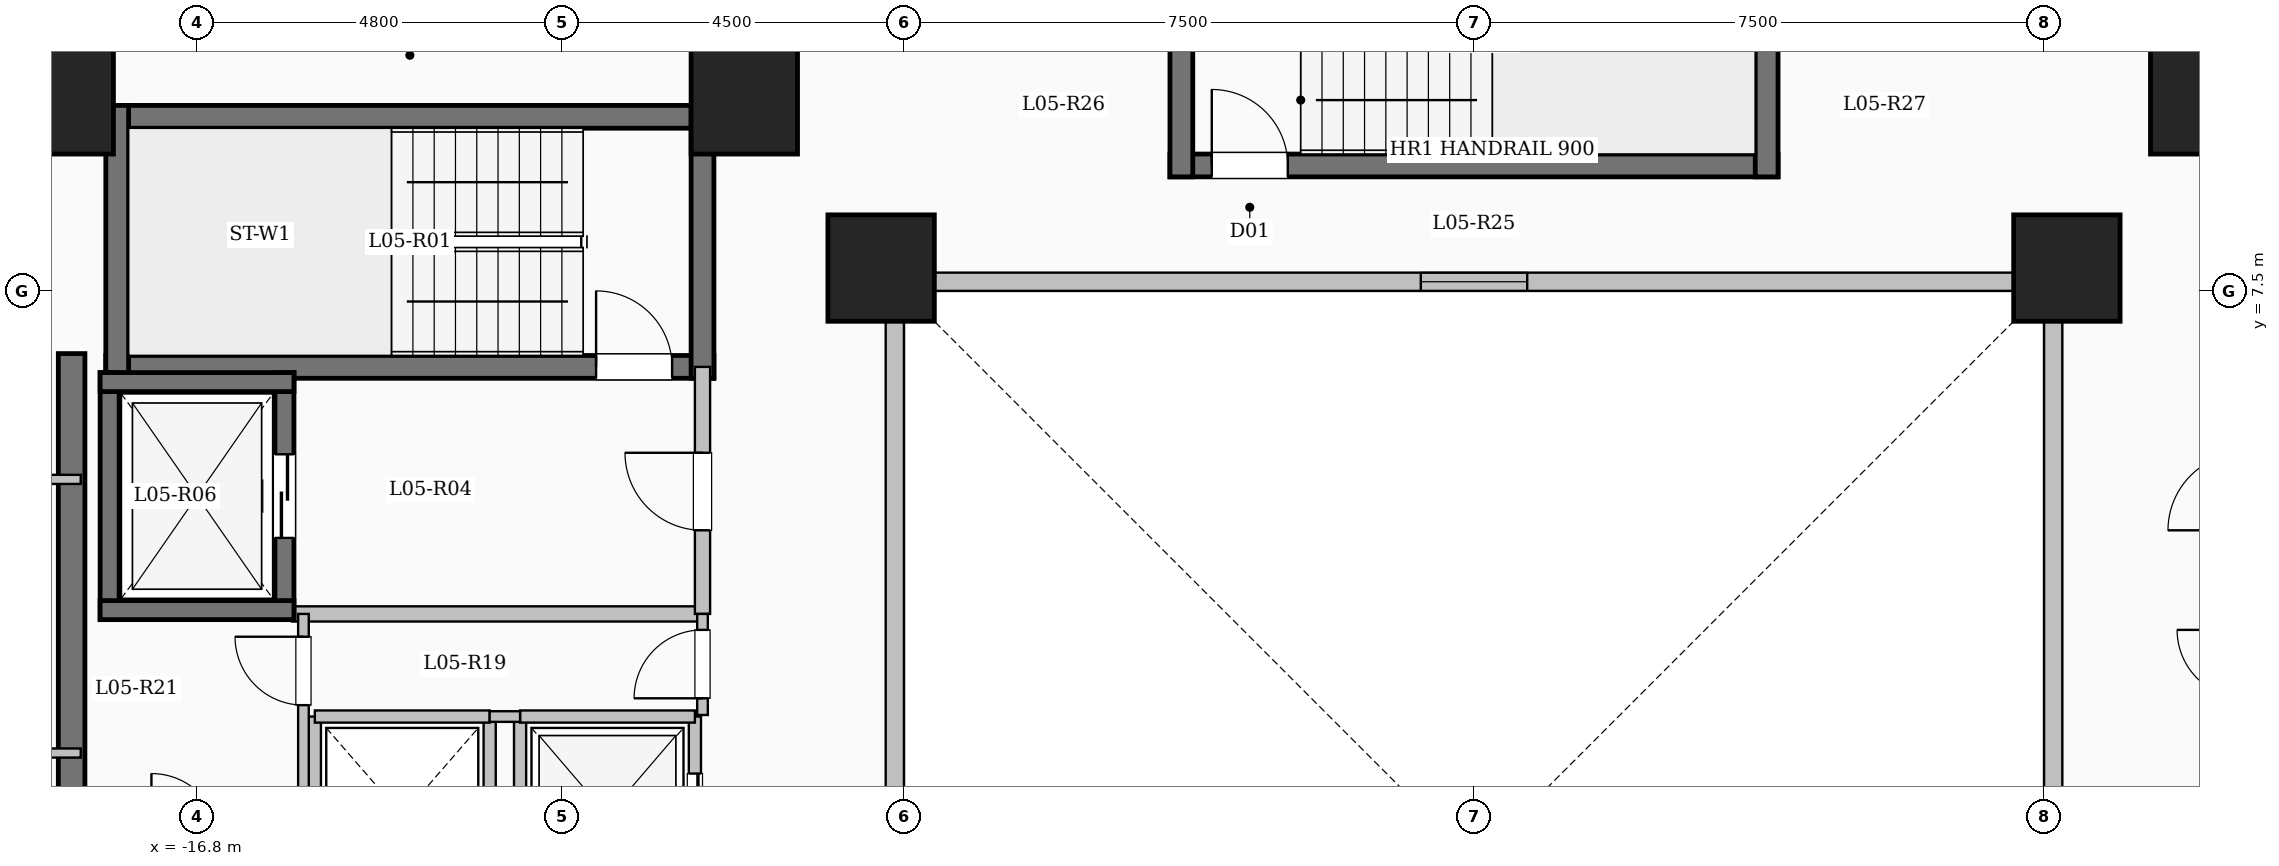
"""IFC4 building model, lengths in metres.
Left out: names, types, materials, properties, quantities, classifications, styles, units other than length and angle.
Written with IfcOpenShell. Run it as: python <this file> out.ifc"""

import sys

from ifc_helpers import new_model, si_unit, direction, frame, frame_2d, origin, origin_2d, place, context, subcontext, project, spatial, rectangle, extrude, element, fill, save


model = new_model("IFC4")
c1 = context("Model", 3, precision=1e-05, world=origin(), true_north=direction((0.0, 1.0)))
c2 = subcontext(c1, "Body", "Model", "MODEL_VIEW")
j1 = project(units=[si_unit("LENGTHUNIT", "METRE"), si_unit("PLANEANGLEUNIT", "RADIAN")], contexts=[c1])
p1 = place(None, origin())
s1 = spatial("IfcSite", under=j1, at=p1, CompositionType="ELEMENT")
p2 = place(p1, origin())
s2 = spatial("IfcBuilding", under=s1, at=p2, CompositionType="ELEMENT")
p3 = place(p2, frame((0.0, 0.0, 24.0)))
s3 = spatial("IfcBuildingStorey", under=s2, at=p3, CompositionType="ELEMENT", Elevation=24.0)
for number, where, z_axis, x_axis in (
    (1, (-7.8, 7.8, 0.0), (0.0, 0.0, 1.0), (1.0, 0.0, 0.0)),
    (2, (7.8, 7.8, 0.0), (0.0, 0.0, 1.0), (1.0, 0.0, 0.0)),
    (3, (-9.6, 10.0, 0.0), (0.0, 0.0, 1.0), (1.0, 0.0, 0.0)),
    (4, (9.6, 10.0, 0.0), (0.0, 0.0, 1.0), (1.0, 0.0, 0.0)),
    (5, (-18.6, 10.0, 0.0), (0.0, 0.0, 1.0), (1.0, 0.0, 0.0)),
):
    element("IfcColumn", number, at=place(p3, frame(where, z_axis=z_axis, x_axis=x_axis)), inside=s3, PredefinedType="COLUMN", context=c2, shape_type="SweptSolid", body=[
        extrude(rectangle(XDim=1.4, YDim=1.4, at=origin_2d()), origin(), (0.0, 0.0, 1.0), 3.35),
    ])
p4 = place(p3, frame((7.62, -7.62, 0.0), z_axis=(0.0, 0.0, 1.0), x_axis=(0.0, 1.0, 0.0)))
e6 = element("IfcWall", 6, at=p4, inside=s3, PredefinedType="SOLIDWALL", context=c2, shape_type="SweptSolid", body=[
    extrude(rectangle(XDim=15.24, YDim=0.24, at=frame_2d((7.62, 0.0))), origin(), (0.0, 0.0, 1.0), 3.1),
])
p5 = place(p4, frame((6.92, 0.0, 0.95)))
e7 = element("IfcOpeningElement", 7, at=p5, cuts=e6, PredefinedType="OPENING", context=c2, shape_type="SweptSolid", body=[
    extrude(rectangle(XDim=1.4, YDim=1.5, at=frame_2d((0.7, 0.75))), frame((0.0, 0.13, 0.0), z_axis=(0.0, -1.0, 0.0), x_axis=(1.0, 0.0, 0.0)), (0.0, 0.0, 1.0), 0.26),
])
p6 = place(p3, frame((7.62, 7.62, 0.0), z_axis=(0.0, 0.0, 1.0), x_axis=(-1.0, 0.0, 0.0)))
e8 = element("IfcWall", 8, at=p6, inside=s3, PredefinedType="SOLIDWALL", context=c2, shape_type="SweptSolid", body=[
    extrude(rectangle(XDim=15.24, YDim=0.24, at=frame_2d((7.62, 0.0))), origin(), (0.0, 0.0, 1.0), 3.1),
])
p7 = place(p6, frame((6.92, 0.0, 0.95)))
e9 = element("IfcOpeningElement", 9, at=p7, cuts=e8, PredefinedType="OPENING", context=c2, shape_type="SweptSolid", body=[
    extrude(rectangle(XDim=1.4, YDim=1.5, at=frame_2d((0.7, 0.75))), frame((0.0, 0.13, 0.0), z_axis=(0.0, -1.0, 0.0), x_axis=(1.0, 0.0, 0.0)), (0.0, 0.0, 1.0), 0.26),
])
p8 = place(p3, frame((-7.62, 7.62, 0.0), z_axis=(0.0, 0.0, 1.0), x_axis=(0.0, -1.0, 0.0)))
e10 = element("IfcWall", 10, at=p8, inside=s3, PredefinedType="SOLIDWALL", context=c2, shape_type="SweptSolid", body=[
    extrude(rectangle(XDim=15.24, YDim=0.24, at=frame_2d((7.62, 0.0))), origin(), (0.0, 0.0, 1.0), 3.1),
])
p9 = place(p8, frame((6.92, 0.0, 0.95)))
e11 = element("IfcOpeningElement", 11, at=p9, cuts=e10, PredefinedType="OPENING", context=c2, shape_type="SweptSolid", body=[
    extrude(rectangle(XDim=1.4, YDim=1.5, at=frame_2d((0.7, 0.75))), frame((0.0, 0.13, 0.0), z_axis=(0.0, -1.0, 0.0), x_axis=(1.0, 0.0, 0.0)), (0.0, 0.0, 1.0), 0.26),
])
p10 = place(p3, frame((-18.0, 9.79, 0.0), z_axis=(0.0, 0.0, 1.0), x_axis=(1.0, 0.0, 0.0)))
e12 = element("IfcWall", 12, at=p10, inside=s3, PredefinedType="SHEAR", context=c2, shape_type="SweptSolid", body=[
    extrude(rectangle(XDim=8.0, YDim=0.3, at=frame_2d((4.0, 0.0))), origin(), (0.0, 0.0, 1.0), 3.35),
])
p11 = place(p3, frame((-18.0, 6.5, 0.0), z_axis=(0.0, 0.0, 1.0), x_axis=(1.0, 0.0, 0.0)))
e13 = element("IfcWall", 13, at=p11, inside=s3, PredefinedType="SHEAR", context=c2, shape_type="SweptSolid", body=[
    extrude(rectangle(XDim=8.0, YDim=0.3, at=frame_2d((4.0, 0.0))), origin(), (0.0, 0.0, 1.0), 3.35),
])
p12 = place(p11, frame((6.45, 0.0, 0.0)))
e14 = element("IfcOpeningElement", 14, at=p12, cuts=e13, PredefinedType="OPENING", context=c2, shape_type="SweptSolid", body=[
    extrude(rectangle(XDim=1.0, YDim=2.15, at=frame_2d((0.5, 1.075))), frame((0.0, 0.16, 0.0), z_axis=(0.0, -1.0, 0.0), x_axis=(1.0, 0.0, 0.0)), (0.0, 0.0, 1.0), 0.32),
])
for number, where, z_axis, x_axis in (
    (15, (-17.85, 6.35, 0.0), (0.0, 0.0, 1.0), (0.0, 1.0, 0.0)),
    (16, (-10.15, 6.35, 0.0), (0.0, 0.0, 1.0), (0.0, 1.0, 0.0)),
):
    element("IfcWall", number, at=place(p3, frame(where, z_axis=z_axis, x_axis=x_axis)), inside=s3, PredefinedType="SHEAR", context=c2, shape_type="SweptSolid", body=[
        extrude(rectangle(XDim=3.59, YDim=0.3, at=frame_2d((1.795, 0.0))), origin(), (0.0, 0.0, 1.0), 3.35),
    ])
p13 = place(p3, frame((-4.0, 9.15, 0.0), z_axis=(0.0, 0.0, 1.0), x_axis=(1.0, 0.0, 0.0)))
e17 = element("IfcWall", 17, at=p13, inside=s3, PredefinedType="SHEAR", context=c2, shape_type="SweptSolid", body=[
    extrude(rectangle(XDim=8.0, YDim=0.3, at=frame_2d((4.0, 0.0))), origin(), (0.0, 0.0, 1.0), 3.35),
])
p14 = place(p13, frame((0.55, 0.0, 0.0)))
e18 = element("IfcOpeningElement", 18, at=p14, cuts=e17, PredefinedType="OPENING", context=c2, shape_type="SweptSolid", body=[
    extrude(rectangle(XDim=1.0, YDim=2.15, at=frame_2d((0.5, 1.075))), frame((0.0, 0.16, 0.0), z_axis=(0.0, -1.0, 0.0), x_axis=(1.0, 0.0, 0.0)), (0.0, 0.0, 1.0), 0.32),
])
for number, where, z_axis, x_axis in (
    (19, (-3.85, 9.0, 0.0), (0.0, 0.0, 1.0), (0.0, 1.0, 0.0)),
    (20, (3.85, 9.0, 0.0), (0.0, 0.0, 1.0), (0.0, 1.0, 0.0)),
):
    element("IfcWall", number, at=place(p3, frame(where, z_axis=z_axis, x_axis=x_axis)), inside=s3, PredefinedType="SHEAR", context=c2, shape_type="SweptSolid", body=[
        extrude(rectangle(XDim=3.59, YDim=0.3, at=frame_2d((1.795, 0.0))), origin(), (0.0, 0.0, 1.0), 3.35),
    ])
p15 = place(p3, frame((-15.55, 3.25, 0.0), z_axis=(0.0, 0.0, 1.0), x_axis=(1.0, 0.0, 0.0)))
e21 = element("IfcWall", 21, at=p15, inside=s3, PredefinedType="SOLIDWALL", context=c2, shape_type="SweptSolid", body=[
    extrude(rectangle(XDim=5.4, YDim=0.2, at=frame_2d((2.7, 0.0))), origin(), (0.0, 0.0, 1.0), 3.1),
])
p16 = place(p3, frame((-10.15, 3.25, 0.0), z_axis=(0.0, 0.0, 1.0), x_axis=(0.0, 1.0, 0.0)))
e22 = element("IfcWall", 22, at=p16, inside=s3, PredefinedType="SOLIDWALL", context=c2, shape_type="SweptSolid", body=[
    extrude(rectangle(XDim=3.25, YDim=0.2, at=frame_2d((1.625, 0.0))), origin(), (0.0, 0.0, 1.0), 3.1),
])
p17 = place(p16, frame((1.1, 0.0, 0.0)))
e23 = element("IfcOpeningElement", 23, at=p17, cuts=e22, PredefinedType="OPENING", context=c2, shape_type="SweptSolid", body=[
    extrude(rectangle(XDim=1.02, YDim=2.15, at=frame_2d((0.51, 1.075))), frame((0.0, 0.11, 0.0), z_axis=(0.0, -1.0, 0.0), x_axis=(1.0, 0.0, 0.0)), (0.0, 0.0, 1.0), 0.22),
])
p18 = place(p3, frame((-17.95, 3.175, 0.0), z_axis=(0.0, 0.0, 1.0), x_axis=(0.0, 1.0, 0.0)))
e24 = element("IfcWall", 24, at=p18, inside=s3, PredefinedType="SHEAR", context=c2, shape_type="SweptSolid", body=[
    extrude(rectangle(XDim=3.25, YDim=0.25, at=frame_2d((1.625, 0.0))), origin(), (0.0, 0.0, 1.0), 3.35),
])
p19 = place(p3, frame((-15.65, 3.175, 0.0), z_axis=(0.0, 0.0, 1.0), x_axis=(0.0, 1.0, 0.0)))
e25 = element("IfcWall", 25, at=p19, inside=s3, PredefinedType="SHEAR", context=c2, shape_type="SweptSolid", body=[
    extrude(rectangle(XDim=3.25, YDim=0.25, at=frame_2d((1.625, 0.0))), origin(), (0.0, 0.0, 1.0), 3.35),
])
p20 = place(p19, frame((1.075, 0.0, 0.0)))
e26 = element("IfcOpeningElement", 26, at=p20, cuts=e25, PredefinedType="OPENING", context=c2, shape_type="SweptSolid", body=[
    extrude(rectangle(XDim=1.1, YDim=2.15, at=frame_2d((0.55, 1.075))), frame((0.0, 0.135, 0.0), z_axis=(0.0, -1.0, 0.0), x_axis=(1.0, 0.0, 0.0)), (0.0, 0.0, 1.0), 0.27),
])
for number, where, z_axis, x_axis in (
    (27, (-18.075, 3.3, 0.0), (0.0, 0.0, 1.0), (1.0, 0.0, 0.0)),
    (28, (-18.075, 6.3, 0.0), (0.0, 0.0, 1.0), (1.0, 0.0, 0.0)),
):
    element("IfcWall", number, at=place(p3, frame(where, z_axis=z_axis, x_axis=x_axis)), inside=s3, PredefinedType="SHEAR", context=c2, shape_type="SweptSolid", body=[
        extrude(rectangle(XDim=2.55, YDim=0.25, at=frame_2d((1.275, 0.0))), origin(), (0.0, 0.0, 1.0), 3.35),
    ])
p21 = place(p3, frame((-12.55, -0.7, 0.0), z_axis=(0.0, 0.0, 1.0), x_axis=(0.0, 1.0, 0.0)))
e29 = element("IfcWall", 29, at=p21, inside=s3, PredefinedType="SOLIDWALL", context=c2, shape_type="SweptSolid", body=[
    extrude(rectangle(XDim=2.6, YDim=0.16, at=frame_2d((1.3, 0.0))), origin(), (0.0, 0.0, 1.0), 3.1),
])
p22 = place(p3, frame((-10.25, -0.7, 0.0), z_axis=(0.0, 0.0, 1.0), x_axis=(0.0, 1.0, 0.0)))
e30 = element("IfcWall", 30, at=p22, inside=s3, PredefinedType="SOLIDWALL", context=c2, shape_type="SweptSolid", body=[
    extrude(rectangle(XDim=2.6, YDim=0.16, at=frame_2d((1.3, 0.0))), origin(), (0.0, 0.0, 1.0), 3.1),
])
p23 = place(p22, frame((0.75, 0.0, 0.0)))
e31 = element("IfcOpeningElement", 31, at=p23, cuts=e30, PredefinedType="OPENING", context=c2, shape_type="SweptSolid", body=[
    extrude(rectangle(XDim=1.1, YDim=2.15, at=frame_2d((0.55, 1.075))), frame((0.0, 0.09, 0.0), z_axis=(0.0, -1.0, 0.0), x_axis=(1.0, 0.0, 0.0)), (0.0, 0.0, 1.0), 0.18),
])
p24 = place(p3, frame((-12.55, 1.9, 0.0), z_axis=(0.0, 0.0, 1.0), x_axis=(1.0, 0.0, 0.0)))
e32 = element("IfcWall", 32, at=p24, inside=s3, PredefinedType="SOLIDWALL", context=c2, shape_type="SweptSolid", body=[
    extrude(rectangle(XDim=2.3, YDim=0.16, at=frame_2d((1.15, 0.0))), origin(), (0.0, 0.0, 1.0), 3.1),
])
for number, where, z_axis, x_axis in (
    (33, (-15.25, -0.7, 0.0), (0.0, 0.0, 1.0), (0.0, 1.0, 0.0)),
    (34, (-12.95, -0.7, 0.0), (0.0, 0.0, 1.0), (0.0, 1.0, 0.0)),
):
    element("IfcWall", number, at=place(p3, frame(where, z_axis=z_axis, x_axis=x_axis)), inside=s3, PredefinedType="SOLIDWALL", context=c2, shape_type="SweptSolid", body=[
        extrude(rectangle(XDim=2.6, YDim=0.16, at=frame_2d((1.3, 0.0))), origin(), (0.0, 0.0, 1.0), 3.1),
    ])
p25 = place(p3, frame((-15.25, 1.9, 0.0), z_axis=(0.0, 0.0, 1.0), x_axis=(1.0, 0.0, 0.0)))
e35 = element("IfcWall", 35, at=p25, inside=s3, PredefinedType="SOLIDWALL", context=c2, shape_type="SweptSolid", body=[
    extrude(rectangle(XDim=2.3, YDim=0.16, at=frame_2d((1.15, 0.0))), origin(), (0.0, 0.0, 1.0), 3.1),
])
p26 = place(p3, frame((-18.45, -7.375, 0.0), z_axis=(0.0, 0.0, 1.0), x_axis=(0.0, 1.0, 0.0)))
e36 = element("IfcWall", 36, at=p26, inside=s3, PredefinedType="SHEAR", context=c2, shape_type="SweptSolid", body=[
    extrude(rectangle(XDim=14.05, YDim=0.35, at=frame_2d((7.025, 0.0))), origin(), (0.0, 0.0, 1.0), 3.35),
])
p27 = place(p3, frame((-12.95, 1.9, 0.0), z_axis=(0.0, 0.0, 1.0), x_axis=(1.0, 0.0, 0.0)))
e37 = element("IfcWall", 37, at=p27, inside=s3, PredefinedType="PARTITIONING", context=c2, shape_type="SweptSolid", body=[
    extrude(rectangle(XDim=0.4, YDim=0.14, at=frame_2d((0.2, 0.0))), origin(), (0.0, 0.0, 1.0), 3.1),
])
p28 = place(p3, frame((-10.15, 1.92, 0.0), z_axis=(0.0, 0.0, 1.0), x_axis=(0.0, 1.0, 0.0)))
e38 = element("IfcWall", 38, at=p28, inside=s3, PredefinedType="PARTITIONING", context=c2, shape_type="SweptSolid", body=[
    extrude(rectangle(XDim=1.33, YDim=0.14, at=frame_2d((0.665, 0.0))), origin(), (0.0, 0.0, 1.0), 3.1),
])
p29 = place(p28, frame((0.22, 0.0, 0.0)))
e39 = element("IfcOpeningElement", 39, at=p29, cuts=e38, PredefinedType="OPENING", context=c2, shape_type="SweptSolid", body=[
    extrude(rectangle(XDim=0.9, YDim=2.08, at=frame_2d((0.45, 1.04))), frame((0.0, 0.08, 0.0), z_axis=(0.0, -1.0, 0.0), x_axis=(1.0, 0.0, 0.0)), (0.0, 0.0, 1.0), 0.16),
])
p30 = place(p3, frame((-15.4, -7.2, 0.0), z_axis=(0.0, 0.0, 1.0), x_axis=(0.0, 1.0, 0.0)))
e40 = element("IfcWall", 40, at=p30, inside=s3, PredefinedType="PARTITIONING", context=c2, shape_type="SweptSolid", body=[
    extrude(rectangle(XDim=10.45, YDim=0.14, at=frame_2d((5.225, 0.0))), origin(), (0.0, 0.0, 1.0), 3.1),
])
p31 = place(p30, frame((9.25, 0.0, 0.0)))
e41 = element("IfcOpeningElement", 41, at=p31, cuts=e40, PredefinedType="OPENING", context=c2, shape_type="SweptSolid", body=[
    extrude(rectangle(XDim=0.9, YDim=2.08, at=frame_2d((0.45, 1.04))), frame((0.0, 0.08, 0.0), z_axis=(0.0, -1.0, 0.0), x_axis=(1.0, 0.0, 0.0)), (0.0, 0.0, 1.0), 0.16),
])
p32 = place(p3, frame((-28.8, 1.42, 0.0), z_axis=(0.0, 0.0, 1.0), x_axis=(1.0, 0.0, 0.0)))
e42 = element("IfcWall", 42, at=p32, inside=s3, PredefinedType="PARTITIONING", context=c2, shape_type="SweptSolid", body=[
    extrude(rectangle(XDim=10.47, YDim=0.12, at=frame_2d((5.235, 0.0))), origin(), (0.0, 0.0, 1.0), 3.1),
])
p33 = place(p32, frame((2.213, 0.0, 0.0)))
e43 = element("IfcOpeningElement", 43, at=p33, cuts=e42, PredefinedType="OPENING", context=c2, shape_type="SweptSolid", body=[
    extrude(rectangle(XDim=0.88, YDim=2.1, at=frame_2d((0.44, 1.05))), frame((0.0, 0.07, 0.0), z_axis=(0.0, -1.0, 0.0), x_axis=(1.0, 0.0, 0.0)), (0.0, 0.0, 1.0), 0.14),
])
p34 = place(p32, frame((7.278, 0.0, 0.0)))
e44 = element("IfcOpeningElement", 44, at=p34, cuts=e42, PredefinedType="OPENING", context=c2, shape_type="SweptSolid", body=[
    extrude(rectangle(XDim=0.88, YDim=2.1, at=frame_2d((0.44, 1.05))), frame((0.0, 0.07, 0.0), z_axis=(0.0, -1.0, 0.0), x_axis=(1.0, 0.0, 0.0)), (0.0, 0.0, 1.0), 0.14),
])
p35 = place(p3, frame((-28.8, 5.02, 0.0), z_axis=(0.0, 0.0, 1.0), x_axis=(1.0, 0.0, 0.0)))
e45 = element("IfcWall", 45, at=p35, inside=s3, PredefinedType="PARTITIONING", context=c2, shape_type="SweptSolid", body=[
    extrude(rectangle(XDim=10.47, YDim=0.12, at=frame_2d((5.235, 0.0))), origin(), (0.0, 0.0, 1.0), 3.1),
])
p36 = place(p35, frame((8.9, 0.0, 0.0)))
e46 = element("IfcOpeningElement", 46, at=p36, cuts=e45, PredefinedType="OPENING", context=c2, shape_type="SweptSolid", body=[
    extrude(rectangle(XDim=0.88, YDim=2.1, at=frame_2d((0.44, 1.05))), frame((0.0, 0.07, 0.0), z_axis=(0.0, -1.0, 0.0), x_axis=(1.0, 0.0, 0.0)), (0.0, 0.0, 1.0), 0.14),
])
p37 = place(p7, origin())
e47 = element("IfcWindow", 47, at=p37, inside=s3, PartitioningType="SINGLE_PANEL", PredefinedType="WINDOW", context=c2, shape_type="SweptSolid", body=[
    extrude(rectangle(XDim=1.4, YDim=1.5, at=frame_2d((0.7, 0.75))), frame((0.0, 0.03, 0.0), z_axis=(0.0, -1.0, 0.0), x_axis=(1.0, 0.0, 0.0)), (0.0, 0.0, 1.0), 0.06),
])
fill(e9, e47)
p38 = place(p12, origin())
e48 = element("IfcDoor", 48, at=p38, inside=s3, OperationType="SINGLE_SWING_LEFT", PredefinedType="DOOR", context=c2, shape_type="SweptSolid", body=[
    extrude(rectangle(XDim=1.0, YDim=2.15, at=frame_2d((0.5, 1.075))), frame((0.0, 0.025, 0.0), z_axis=(0.0, -1.0, 0.0), x_axis=(1.0, 0.0, 0.0)), (0.0, 0.0, 1.0), 0.05),
])
fill(e14, e48)
p39 = place(p14, origin())
e49 = element("IfcDoor", 49, at=p39, inside=s3, OperationType="SINGLE_SWING_LEFT", PredefinedType="DOOR", context=c2, shape_type="SweptSolid", body=[
    extrude(rectangle(XDim=1.0, YDim=2.15, at=frame_2d((0.5, 1.075))), frame((0.0, 0.025, 0.0), z_axis=(0.0, -1.0, 0.0), x_axis=(1.0, 0.0, 0.0)), (0.0, 0.0, 1.0), 0.05),
])
fill(e18, e49)
p40 = place(p17, origin())
e50 = element("IfcDoor", 50, at=p40, inside=s3, OperationType="SINGLE_SWING_RIGHT", PredefinedType="DOOR", context=c2, shape_type="SweptSolid", body=[
    extrude(rectangle(XDim=1.02, YDim=2.15, at=frame_2d((0.51, 1.075))), frame((0.0, 0.025, 0.0), z_axis=(0.0, -1.0, 0.0), x_axis=(1.0, 0.0, 0.0)), (0.0, 0.0, 1.0), 0.05),
])
fill(e23, e50)
p41 = place(p20, origin())
e51 = element("IfcDoor", 51, at=p41, inside=s3, OperationType="SLIDING_TO_LEFT", PredefinedType="DOOR", context=c2, shape_type="SweptSolid", body=[
    extrude(rectangle(XDim=1.1, YDim=2.15, at=frame_2d((0.55, 1.075))), frame((0.0, 0.025, 0.0), z_axis=(0.0, -1.0, 0.0), x_axis=(1.0, 0.0, 0.0)), (0.0, 0.0, 1.0), 0.05),
])
fill(e26, e51)
p42 = place(p23, origin())
e52 = element("IfcDoor", 52, at=p42, inside=s3, OperationType="SLIDING_TO_LEFT", PredefinedType="DOOR", context=c2, shape_type="SweptSolid", body=[
    extrude(rectangle(XDim=1.1, YDim=2.15, at=frame_2d((0.55, 1.075))), frame((0.0, 0.025, 0.0), z_axis=(0.0, -1.0, 0.0), x_axis=(1.0, 0.0, 0.0)), (0.0, 0.0, 1.0), 0.05),
])
fill(e31, e52)
p43 = place(p29, origin())
e53 = element("IfcDoor", 53, at=p43, inside=s3, OperationType="SINGLE_SWING_LEFT", PredefinedType="DOOR", context=c2, shape_type="SweptSolid", body=[
    extrude(rectangle(XDim=0.9, YDim=2.08, at=frame_2d((0.45, 1.04))), frame((0.0, 0.025, 0.0), z_axis=(0.0, -1.0, 0.0), x_axis=(1.0, 0.0, 0.0)), (0.0, 0.0, 1.0), 0.05),
])
fill(e39, e53)
p44 = place(p31, origin())
e54 = element("IfcDoor", 54, at=p44, inside=s3, OperationType="SINGLE_SWING_RIGHT", PredefinedType="DOOR", context=c2, shape_type="SweptSolid", body=[
    extrude(rectangle(XDim=0.9, YDim=2.08, at=frame_2d((0.45, 1.04))), frame((0.0, 0.025, 0.0), z_axis=(0.0, -1.0, 0.0), x_axis=(1.0, 0.0, 0.0)), (0.0, 0.0, 1.0), 0.05),
])
fill(e41, e54)
save(model, sys.argv[1])
